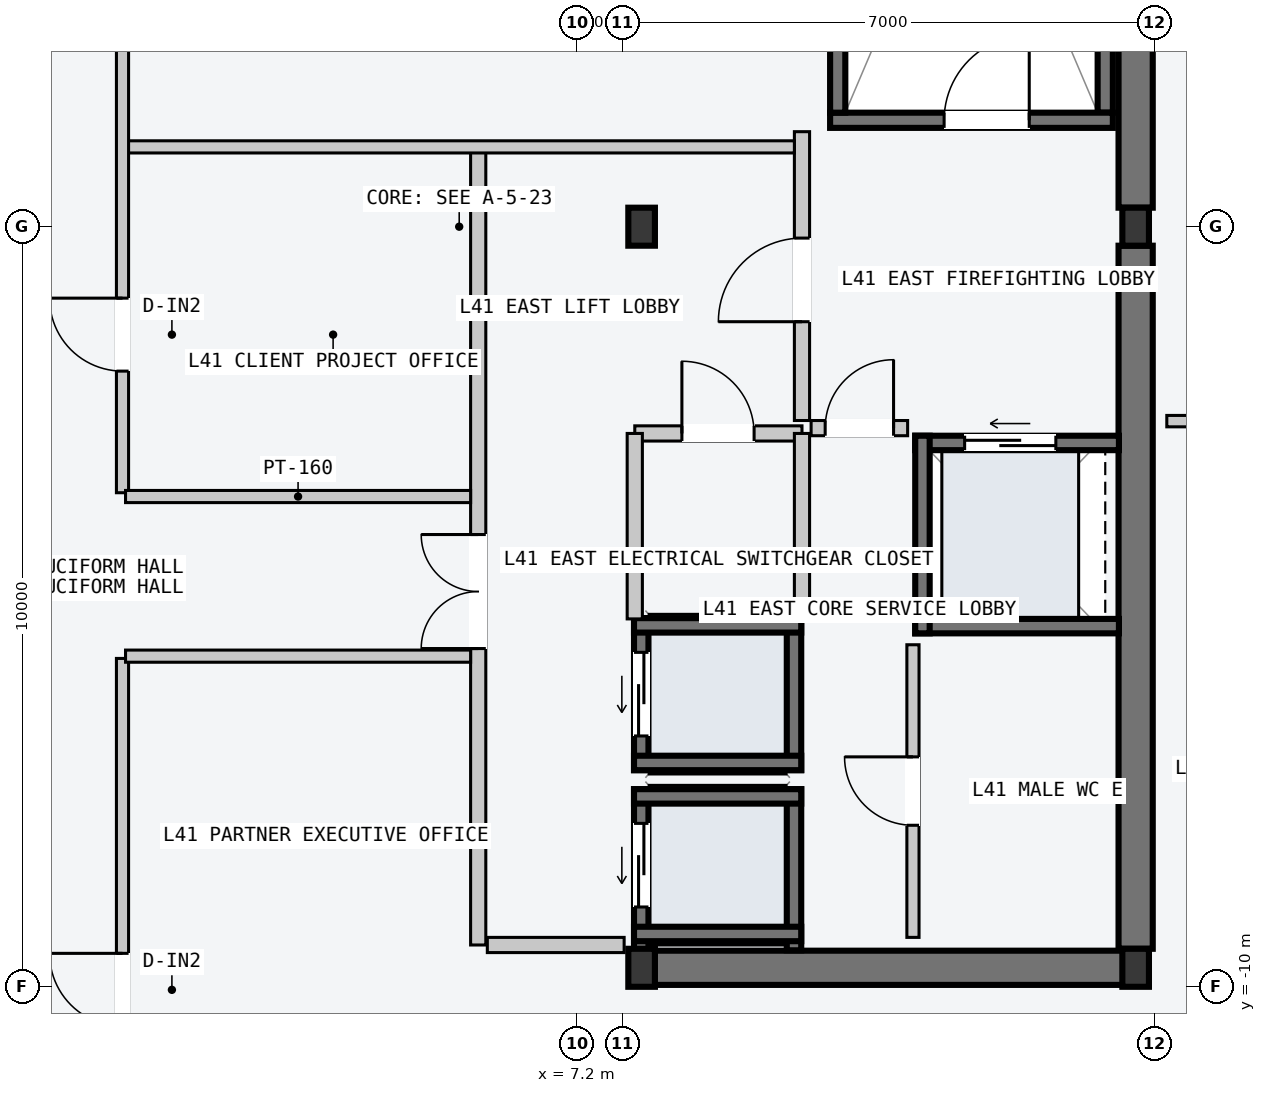
"""IFC4 building model, lengths in metres.
Left out: names, types, materials, properties, quantities, classifications, styles, units other than length and angle.
Written with IfcOpenShell. Run it as: python <this file> out.ifc"""

import sys

from ifc_helpers import new_model, si_unit, direction, frame, frame_2d, origin, origin_2d, place, context, subcontext, project, spatial, rectangle, i_section, extrude, element, fill, save


model = new_model("IFC4")
c1 = context("Model", 3, precision=1e-05, world=origin(), true_north=direction((0.0, 1.0)))
c2 = subcontext(c1, "Body", "Model", "MODEL_VIEW")
j1 = project(units=[si_unit("LENGTHUNIT", "METRE"), si_unit("PLANEANGLEUNIT", "RADIAN")], contexts=[c1])
p1 = place(None, origin())
s1 = spatial("IfcSite", under=j1, at=p1, CompositionType="ELEMENT")
p2 = place(p1, origin())
s2 = spatial("IfcBuilding", under=s1, at=p2, CompositionType="ELEMENT")
p3 = place(p2, frame((0.0, 0.0, 158.7)))
s3 = spatial("IfcBuildingStorey", under=s2, at=p3, CompositionType="ELEMENT", Elevation=158.7)
p4 = place(p3, frame((8.07, -9.75, -0.2), z_axis=(0.0, 0.0, 1.0), x_axis=(1.0, 0.0, 0.0)))
e1 = element("IfcWall", 1, at=p4, inside=s3, PredefinedType="SHEAR", context=c2, shape_type="SweptSolid", body=[
    extrude(rectangle(XDim=6.46, YDim=0.45, at=frame_2d((3.23, 0.0))), origin(), (0.0, 0.0, 1.0), 3.6),
])
for number, where, z_axis, x_axis in (
    (2, (14.55, -9.5, -0.2), (0.0, 0.0, 1.0), (0.0, 1.0, 0.0)),
    (3, (14.55, 0.25, -0.2), (0.0, 0.0, 1.0), (0.0, 1.0, 0.0)),
):
    element("IfcWall", number, at=place(p3, frame(where, z_axis=z_axis, x_axis=x_axis)), inside=s3, PredefinedType="SHEAR", context=c2, shape_type="SweptSolid", body=[
        extrude(rectangle(XDim=9.25, YDim=0.45, at=frame_2d((4.625, 0.0))), origin(), (0.0, 0.0, 1.0), 3.6),
    ])
p5 = place(p3, frame((14.15, 1.5, -0.2), z_axis=(0.0, 0.0, 1.0), x_axis=(0.0, 1.0, 0.0)))
e4 = element("IfcWall", 4, at=p5, inside=s3, PredefinedType="SOLIDWALL", context=c2, shape_type="SweptSolid", body=[
    extrude(rectangle(XDim=7.8, YDim=0.2, at=frame_2d((3.9, 0.0))), origin(), (0.0, 0.0, 1.0), 3.6),
])
p6 = place(p3, frame((10.53, 1.4, -0.2), z_axis=(0.0, 0.0, 1.0), x_axis=(1.0, 0.0, 0.0)))
e5 = element("IfcWall", 5, at=p6, inside=s3, PredefinedType="SOLIDWALL", context=c2, shape_type="SweptSolid", body=[
    extrude(rectangle(XDim=3.72, YDim=0.2, at=frame_2d((1.86, 0.0))), origin(), (0.0, 0.0, 1.0), 3.6),
])
p7 = place(p6, frame((1.5, 0.0, 0.2)))
e6 = element("IfcOpeningElement", 6, at=p7, cuts=e5, PredefinedType="OPENING", context=c2, shape_type="SweptSolid", body=[
    extrude(rectangle(XDim=1.12, YDim=2.18, at=frame_2d((0.56, 1.09))), frame((0.0, 0.11, 0.0), z_axis=(0.0, -1.0, 0.0), x_axis=(1.0, 0.0, 0.0)), (0.0, 0.0, 1.0), 0.22),
])
p8 = place(p3, frame((10.63, 1.5, -0.2), z_axis=(0.0, 0.0, 1.0), x_axis=(0.0, 1.0, 0.0)))
e7 = element("IfcWall", 7, at=p8, inside=s3, PredefinedType="SOLIDWALL", context=c2, shape_type="SweptSolid", body=[
    extrude(rectangle(XDim=7.8, YDim=0.2, at=frame_2d((3.9, 0.0))), origin(), (0.0, 0.0, 1.0), 3.6),
])
for number, where, z_axis, x_axis in (
    (8, (8.05, -9.75, 0.0), (0.0, 0.0, 1.0), (1.0, 0.0, 0.0)),
    (9, (8.05, 0.0, 0.0), (0.0, 0.0, 1.0), (1.0, 0.0, 0.0)),
    (10, (14.55, -9.75, 0.0), (0.0, 0.0, 1.0), (1.0, 0.0, 0.0)),
    (11, (14.55, 0.0, 0.0), (0.0, 0.0, 1.0), (1.0, 0.0, 0.0)),
):
    element("IfcColumn", number, at=place(p3, frame(where, z_axis=z_axis, x_axis=x_axis)), inside=s3, PredefinedType="COLUMN", context=c2, shape_type="SweptSolid", body=[
        extrude(i_section(OverallWidth=0.35, OverallDepth=0.5, WebThickness=0.02, FlangeThickness=0.032, at=origin_2d()), origin(), (0.0, 0.0, 1.0), 3.6),
    ])
p9 = place(p3, frame((8.045, -9.52, -0.2), z_axis=(0.0, 0.0, 1.0), x_axis=(0.0, 1.0, 0.0)))
e12 = element("IfcWall", 12, at=p9, inside=s3, PredefinedType="SOLIDWALL", context=c2, shape_type="SweptSolid", body=[
    extrude(rectangle(XDim=2.12, YDim=0.19, at=frame_2d((1.06, 0.0))), origin(), (0.0, 0.0, 1.0), 3.6),
])
p10 = place(p9, frame((0.57, 0.0, 0.2)))
e13 = element("IfcOpeningElement", 13, at=p10, cuts=e12, PredefinedType="OPENING", context=c2, shape_type="SweptSolid", body=[
    extrude(rectangle(XDim=1.1, YDim=2.2, at=frame_2d((0.55, 1.1))), frame((0.0, 0.105, 0.0), z_axis=(0.0, -1.0, 0.0), x_axis=(1.0, 0.0, 0.0)), (0.0, 0.0, 1.0), 0.21),
])
p11 = place(p3, frame((10.055, -9.52, -0.2), z_axis=(0.0, 0.0, 1.0), x_axis=(0.0, 1.0, 0.0)))
e14 = element("IfcWall", 14, at=p11, inside=s3, PredefinedType="SOLIDWALL", context=c2, shape_type="SweptSolid", body=[
    extrude(rectangle(XDim=2.12, YDim=0.19, at=frame_2d((1.06, 0.0))), origin(), (0.0, 0.0, 1.0), 3.6),
])
for number, where, z_axis, x_axis in (
    (15, (7.95, -7.495, -0.2), (0.0, 0.0, 1.0), (1.0, 0.0, 0.0)),
    (16, (7.95, -9.305, -0.2), (0.0, 0.0, 1.0), (1.0, 0.0, 0.0)),
):
    element("IfcWall", number, at=place(p3, frame(where, z_axis=z_axis, x_axis=x_axis)), inside=s3, PredefinedType="SOLIDWALL", context=c2, shape_type="SweptSolid", body=[
        extrude(rectangle(XDim=2.2, YDim=0.19, at=frame_2d((1.1, 0.0))), origin(), (0.0, 0.0, 1.0), 3.6),
    ])
p12 = place(p3, frame((8.045, -7.15, -0.2), z_axis=(0.0, 0.0, 1.0), x_axis=(0.0, 1.0, 0.0)))
e17 = element("IfcWall", 17, at=p12, inside=s3, PredefinedType="SOLIDWALL", context=c2, shape_type="SweptSolid", body=[
    extrude(rectangle(XDim=2.0, YDim=0.19, at=frame_2d((1.0, 0.0))), origin(), (0.0, 0.0, 1.0), 3.6),
])
p13 = place(p12, frame((0.45, 0.0, 0.2)))
e18 = element("IfcOpeningElement", 18, at=p13, cuts=e17, PredefinedType="OPENING", context=c2, shape_type="SweptSolid", body=[
    extrude(rectangle(XDim=1.1, YDim=2.2, at=frame_2d((0.55, 1.1))), frame((0.0, 0.105, 0.0), z_axis=(0.0, -1.0, 0.0), x_axis=(1.0, 0.0, 0.0)), (0.0, 0.0, 1.0), 0.21),
])
p14 = place(p3, frame((10.055, -7.15, -0.2), z_axis=(0.0, 0.0, 1.0), x_axis=(0.0, 1.0, 0.0)))
e19 = element("IfcWall", 19, at=p14, inside=s3, PredefinedType="SOLIDWALL", context=c2, shape_type="SweptSolid", body=[
    extrude(rectangle(XDim=2.0, YDim=0.19, at=frame_2d((1.0, 0.0))), origin(), (0.0, 0.0, 1.0), 3.6),
])
for number, where, z_axis, x_axis in (
    (20, (7.95, -5.245, -0.2), (0.0, 0.0, 1.0), (1.0, 0.0, 0.0)),
    (21, (7.95, -7.055, -0.2), (0.0, 0.0, 1.0), (1.0, 0.0, 0.0)),
):
    element("IfcWall", number, at=place(p3, frame(where, z_axis=z_axis, x_axis=x_axis)), inside=s3, PredefinedType="SOLIDWALL", context=c2, shape_type="SweptSolid", body=[
        extrude(rectangle(XDim=2.2, YDim=0.19, at=frame_2d((1.1, 0.0))), origin(), (0.0, 0.0, 1.0), 3.6),
    ])
p15 = place(p3, frame((11.65, -2.845, -0.2), z_axis=(0.0, 0.0, 1.0), x_axis=(1.0, 0.0, 0.0)))
e22 = element("IfcWall", 22, at=p15, inside=s3, PredefinedType="SOLIDWALL", context=c2, shape_type="SweptSolid", body=[
    extrude(rectangle(XDim=2.68, YDim=0.19, at=frame_2d((1.34, 0.0))), origin(), (0.0, 0.0, 1.0), 3.6),
])
p16 = place(p15, frame((0.65, 0.0, 0.2)))
e23 = element("IfcOpeningElement", 23, at=p16, cuts=e22, PredefinedType="OPENING", context=c2, shape_type="SweptSolid", body=[
    extrude(rectangle(XDim=1.2, YDim=2.2, at=frame_2d((0.6, 1.1))), frame((0.0, 0.105, 0.0), z_axis=(0.0, -1.0, 0.0), x_axis=(1.0, 0.0, 0.0)), (0.0, 0.0, 1.0), 0.21),
])
p17 = place(p3, frame((11.65, -5.255, -0.2), z_axis=(0.0, 0.0, 1.0), x_axis=(1.0, 0.0, 0.0)))
e24 = element("IfcWall", 24, at=p17, inside=s3, PredefinedType="SOLIDWALL", context=c2, shape_type="SweptSolid", body=[
    extrude(rectangle(XDim=2.68, YDim=0.19, at=frame_2d((1.34, 0.0))), origin(), (0.0, 0.0, 1.0), 3.6),
])
p18 = place(p3, frame((11.745, -5.35, -0.2), z_axis=(0.0, 0.0, 1.0), x_axis=(0.0, 1.0, 0.0)))
e25 = element("IfcWall", 25, at=p18, inside=s3, PredefinedType="SOLIDWALL", context=c2, shape_type="SweptSolid", body=[
    extrude(rectangle(XDim=2.6, YDim=0.19, at=frame_2d((1.3, 0.0))), origin(), (0.0, 0.0, 1.0), 3.6),
])
p19 = place(p3, frame((5.9, -9.45, 0.0), z_axis=(0.0, 0.0, 1.0), x_axis=(0.0, 1.0, 0.0)))
e26 = element("IfcWall", 26, at=p19, inside=s3, PredefinedType="PARTITIONING", context=c2, shape_type="SweptSolid", body=[
    extrude(rectangle(XDim=10.5, YDim=0.2, at=frame_2d((5.25, 0.0))), origin(), (0.0, 0.0, 1.0), 3.4),
])
p20 = place(p19, frame((3.9, 0.0, 0.0)))
e27 = element("IfcOpeningElement", 27, at=p20, cuts=e26, PredefinedType="OPENING", context=c2, shape_type="SweptSolid", body=[
    extrude(rectangle(XDim=1.5, YDim=2.2, at=frame_2d((0.75, 1.1))), frame((0.0, 0.11, 0.0), z_axis=(0.0, -1.0, 0.0), x_axis=(1.0, 0.0, 0.0)), (0.0, 0.0, 1.0), 0.22),
])
p21 = place(p3, frame((6.02, -9.45, 0.0), z_axis=(0.0, 0.0, 1.0), x_axis=(1.0, 0.0, 0.0)))
e28 = element("IfcWall", 28, at=p21, inside=s3, PredefinedType="PARTITIONING", context=c2, shape_type="SweptSolid", body=[
    extrude(rectangle(XDim=1.8, YDim=0.2, at=frame_2d((0.9, 0.0))), origin(), (0.0, 0.0, 1.0), 3.4),
])
p22 = place(p3, frame((10.16, -2.55, 0.0), z_axis=(0.0, 0.0, 1.0), x_axis=(0.0, 1.0, 0.0)))
e29 = element("IfcWall", 29, at=p22, inside=s3, PredefinedType="PARTITIONING", context=c2, shape_type="SweptSolid", body=[
    extrude(rectangle(XDim=3.8, YDim=0.2, at=frame_2d((1.9, 0.0))), origin(), (0.0, 0.0, 1.0), 3.4),
])
p23 = place(p22, frame((1.3, 0.0, 0.0)))
e30 = element("IfcOpeningElement", 30, at=p23, cuts=e29, PredefinedType="OPENING", context=c2, shape_type="SweptSolid", body=[
    extrude(rectangle(XDim=1.1, YDim=2.15, at=frame_2d((0.55, 1.075))), frame((0.0, 0.11, 0.0), z_axis=(0.0, -1.0, 0.0), x_axis=(1.0, 0.0, 0.0)), (0.0, 0.0, 1.0), 0.22),
])
p24 = place(p3, frame((10.28, -2.65, 0.0), z_axis=(0.0, 0.0, 1.0), x_axis=(1.0, 0.0, 0.0)))
e31 = element("IfcWall", 31, at=p24, inside=s3, PredefinedType="PARTITIONING", context=c2, shape_type="SweptSolid", body=[
    extrude(rectangle(XDim=1.27, YDim=0.2, at=frame_2d((0.635, 0.0))), origin(), (0.0, 0.0, 1.0), 3.4),
])
p25 = place(p24, frame((0.185, 0.0, 0.0)))
e32 = element("IfcOpeningElement", 32, at=p25, cuts=e31, PredefinedType="OPENING", context=c2, shape_type="SweptSolid", body=[
    extrude(rectangle(XDim=0.9, YDim=2.15, at=frame_2d((0.45, 1.075))), frame((0.0, 0.11, 0.0), z_axis=(0.0, -1.0, 0.0), x_axis=(1.0, 0.0, 0.0)), (0.0, 0.0, 1.0), 0.22),
])
p26 = place(p3, frame((7.96, -2.72, 0.0), z_axis=(0.0, 0.0, 1.0), x_axis=(1.0, 0.0, 0.0)))
e33 = element("IfcWall", 33, at=p26, inside=s3, PredefinedType="PARTITIONING", context=c2, shape_type="SweptSolid", body=[
    extrude(rectangle(XDim=2.2, YDim=0.2, at=frame_2d((1.1, 0.0))), origin(), (0.0, 0.0, 1.0), 3.4),
])
p27 = place(p26, frame((0.62, 0.0, 0.0)))
e34 = element("IfcOpeningElement", 34, at=p27, cuts=e33, PredefinedType="OPENING", context=c2, shape_type="SweptSolid", body=[
    extrude(rectangle(XDim=0.95, YDim=2.1, at=frame_2d((0.475, 1.05))), frame((0.0, 0.11, 0.0), z_axis=(0.0, -1.0, 0.0), x_axis=(1.0, 0.0, 0.0)), (0.0, 0.0, 1.0), 0.22),
])
for number, where, z_axis, x_axis in (
    (35, (7.96, -5.16, 0.0), (0.0, 0.0, 1.0), (0.0, 1.0, 0.0)),
    (36, (10.16, -5.16, 0.0), (0.0, 0.0, 1.0), (0.0, 1.0, 0.0)),
):
    element("IfcWall", number, at=place(p3, frame(where, z_axis=z_axis, x_axis=x_axis)), inside=s3, PredefinedType="PARTITIONING", context=c2, shape_type="SweptSolid", body=[
        extrude(rectangle(XDim=2.44, YDim=0.2, at=frame_2d((1.22, 0.0))), origin(), (0.0, 0.0, 1.0), 3.4),
    ])
p28 = place(p3, frame((11.62, -9.35, 0.0), z_axis=(0.0, 0.0, 1.0), x_axis=(0.0, 1.0, 0.0)))
e37 = element("IfcWall", 37, at=p28, inside=s3, PredefinedType="PARTITIONING", context=c2, shape_type="SweptSolid", body=[
    extrude(rectangle(XDim=3.85, YDim=0.16, at=frame_2d((1.925, 0.0))), origin(), (0.0, 0.0, 1.0), 3.4),
])
p29 = place(p28, frame((1.475, 0.0, 0.0)))
e38 = element("IfcOpeningElement", 38, at=p29, cuts=e37, PredefinedType="OPENING", context=c2, shape_type="SweptSolid", body=[
    extrude(rectangle(XDim=0.9, YDim=2.15, at=frame_2d((0.45, 1.075))), frame((0.0, 0.09, 0.0), z_axis=(0.0, -1.0, 0.0), x_axis=(1.0, 0.0, 0.0)), (0.0, 0.0, 1.0), 0.18),
])
p30 = place(p3, frame((1.26, 1.05, 0.0), z_axis=(0.0, 0.0, 1.0), x_axis=(1.0, 0.0, 0.0)))
e39 = element("IfcWall", 39, at=p30, inside=s3, PredefinedType="PARTITIONING", context=c2, shape_type="SweptSolid", body=[
    extrude(rectangle(XDim=8.8, YDim=0.16, at=frame_2d((4.4, 0.0))), origin(), (0.0, 0.0, 1.0), 3.4),
])
p31 = place(p3, frame((1.22, -3.5, 0.0), z_axis=(0.0, 0.0, 1.0), x_axis=(0.0, 1.0, 0.0)))
e40 = element("IfcWall", 40, at=p31, inside=s3, PredefinedType="PARTITIONING", context=c2, shape_type="SweptSolid", body=[
    extrude(rectangle(XDim=13.51, YDim=0.16, at=frame_2d((6.755, 0.0))), origin(), (0.0, 0.0, 1.0), 3.4),
])
p32 = place(p31, frame((6.1, 0.0, 0.0)))
e41 = element("IfcOpeningElement", 41, at=p32, cuts=e40, PredefinedType="OPENING", context=c2, shape_type="SweptSolid", body=[
    extrude(rectangle(XDim=1.24, YDim=2.24, at=frame_2d((0.62, 1.12))), frame((0.0, 0.09, 0.0), z_axis=(0.0, -1.0, 0.0), x_axis=(1.0, 0.0, 0.0)), (0.0, 0.0, 1.0), 0.18),
])
p33 = place(p31, frame((1.6, 0.0, 0.0)))
e42 = element("IfcOpeningElement", 42, at=p33, cuts=e40, PredefinedType="OPENING", context=c2, shape_type="SweptSolid", body=[
    extrude(rectangle(XDim=0.96, YDim=2.18, at=frame_2d((0.48, 1.09))), frame((0.0, 0.09, 0.0), z_axis=(0.0, -1.0, 0.0), x_axis=(1.0, 0.0, 0.0)), (0.0, 0.0, 1.0), 0.18),
])
p34 = place(p3, frame((1.26, -3.55, 0.0), z_axis=(0.0, 0.0, 1.0), x_axis=(1.0, 0.0, 0.0)))
e43 = element("IfcWall", 43, at=p34, inside=s3, PredefinedType="PARTITIONING", context=c2, shape_type="SweptSolid", body=[
    extrude(rectangle(XDim=4.54, YDim=0.16, at=frame_2d((2.27, 0.0))), origin(), (0.0, 0.0, 1.0), 3.4),
])
p35 = place(p3, frame((1.22, -11.67, 0.0), z_axis=(0.0, 0.0, 1.0), x_axis=(0.0, 1.0, 0.0)))
e44 = element("IfcWall", 44, at=p35, inside=s3, PredefinedType="PARTITIONING", context=c2, shape_type="SweptSolid", body=[
    extrude(rectangle(XDim=5.99, YDim=0.16, at=frame_2d((2.995, 0.0))), origin(), (0.0, 0.0, 1.0), 3.4),
])
p36 = place(p35, frame((1.15, 0.0, 0.0)))
e45 = element("IfcOpeningElement", 45, at=p36, cuts=e44, PredefinedType="OPENING", context=c2, shape_type="SweptSolid", body=[
    extrude(rectangle(XDim=0.96, YDim=2.18, at=frame_2d((0.48, 1.09))), frame((0.0, 0.09, 0.0), z_axis=(0.0, -1.0, 0.0), x_axis=(1.0, 0.0, 0.0)), (0.0, 0.0, 1.0), 0.18),
])
p37 = place(p3, frame((1.26, -5.65, 0.0), z_axis=(0.0, 0.0, 1.0), x_axis=(1.0, 0.0, 0.0)))
e46 = element("IfcWall", 46, at=p37, inside=s3, PredefinedType="PARTITIONING", context=c2, shape_type="SweptSolid", body=[
    extrude(rectangle(XDim=4.54, YDim=0.16, at=frame_2d((2.27, 0.0))), origin(), (0.0, 0.0, 1.0), 3.4),
])
p38 = place(p3, frame((14.96, -2.558, 0.0), z_axis=(0.0, 0.0, 1.0), x_axis=(1.0, 0.0, 0.0)))
e47 = element("IfcWall", 47, at=p38, inside=s3, PredefinedType="PARTITIONING", context=c2, shape_type="SweptSolid", body=[
    extrude(rectangle(XDim=5.6, YDim=0.15, at=frame_2d((2.8, 0.0))), origin(), (0.0, 0.0, 1.0), 3.4),
])
p39 = place(p38, frame((0.9, 0.0, 0.0)))
e48 = element("IfcOpeningElement", 48, at=p39, cuts=e47, PredefinedType="OPENING", context=c2, shape_type="SweptSolid", body=[
    extrude(rectangle(XDim=0.96, YDim=2.18, at=frame_2d((0.48, 1.09))), frame((0.0, 0.085, 0.0), z_axis=(0.0, -1.0, 0.0), x_axis=(1.0, 0.0, 0.0)), (0.0, 0.0, 1.0), 0.17),
])
p40 = place(p7, origin())
e49 = element("IfcDoor", 49, at=p40, inside=s3, OperationType="SINGLE_SWING_RIGHT", PredefinedType="DOOR", context=c2, shape_type="SweptSolid", body=[
    extrude(rectangle(XDim=1.12, YDim=2.18, at=frame_2d((0.56, 1.09))), frame((0.0, 0.025, 0.0), z_axis=(0.0, -1.0, 0.0), x_axis=(1.0, 0.0, 0.0)), (0.0, 0.0, 1.0), 0.05),
])
fill(e6, e49)
p41 = place(p10, origin())
e50 = element("IfcDoor", 50, at=p41, inside=s3, OperationType="SLIDING_TO_LEFT", PredefinedType="DOOR", context=c2, shape_type="SweptSolid", body=[
    extrude(rectangle(XDim=1.1, YDim=2.2, at=frame_2d((0.55, 1.1))), frame((0.0, 0.025, 0.0), z_axis=(0.0, -1.0, 0.0), x_axis=(1.0, 0.0, 0.0)), (0.0, 0.0, 1.0), 0.05),
])
fill(e13, e50)
p42 = place(p13, origin())
e51 = element("IfcDoor", 51, at=p42, inside=s3, OperationType="SLIDING_TO_LEFT", PredefinedType="DOOR", context=c2, shape_type="SweptSolid", body=[
    extrude(rectangle(XDim=1.1, YDim=2.2, at=frame_2d((0.55, 1.1))), frame((0.0, 0.025, 0.0), z_axis=(0.0, -1.0, 0.0), x_axis=(1.0, 0.0, 0.0)), (0.0, 0.0, 1.0), 0.05),
])
fill(e18, e51)
p43 = place(p16, origin())
e52 = element("IfcDoor", 52, at=p43, inside=s3, OperationType="SLIDING_TO_LEFT", PredefinedType="DOOR", context=c2, shape_type="SweptSolid", body=[
    extrude(rectangle(XDim=1.2, YDim=2.2, at=frame_2d((0.6, 1.1))), frame((0.0, 0.025, 0.0), z_axis=(0.0, -1.0, 0.0), x_axis=(1.0, 0.0, 0.0)), (0.0, 0.0, 1.0), 0.05),
])
fill(e23, e52)
p44 = place(p20, origin())
e53 = element("IfcDoor", 53, at=p44, inside=s3, OperationType="DOUBLE_DOOR_SINGLE_SWING", PredefinedType="DOOR", context=c2, shape_type="SweptSolid", body=[
    extrude(rectangle(XDim=1.5, YDim=2.2, at=frame_2d((0.75, 1.1))), frame((0.0, 0.025, 0.0), z_axis=(0.0, -1.0, 0.0), x_axis=(1.0, 0.0, 0.0)), (0.0, 0.0, 1.0), 0.05),
])
fill(e27, e53)
p45 = place(p23, origin())
e54 = element("IfcDoor", 54, at=p45, inside=s3, OperationType="SINGLE_SWING_LEFT", PredefinedType="DOOR", context=c2, shape_type="SweptSolid", body=[
    extrude(rectangle(XDim=1.1, YDim=2.15, at=frame_2d((0.55, 1.075))), frame((0.0, 0.025, 0.0), z_axis=(0.0, -1.0, 0.0), x_axis=(1.0, 0.0, 0.0)), (0.0, 0.0, 1.0), 0.05),
])
fill(e30, e54)
p46 = place(p25, origin())
e55 = element("IfcDoor", 55, at=p46, inside=s3, OperationType="SINGLE_SWING_RIGHT", PredefinedType="DOOR", context=c2, shape_type="SweptSolid", body=[
    extrude(rectangle(XDim=0.9, YDim=2.15, at=frame_2d((0.45, 1.075))), frame((0.0, 0.025, 0.0), z_axis=(0.0, -1.0, 0.0), x_axis=(1.0, 0.0, 0.0)), (0.0, 0.0, 1.0), 0.05),
])
fill(e32, e55)
p47 = place(p27, origin())
e56 = element("IfcDoor", 56, at=p47, inside=s3, OperationType="SINGLE_SWING_LEFT", PredefinedType="DOOR", context=c2, shape_type="SweptSolid", body=[
    extrude(rectangle(XDim=0.95, YDim=2.1, at=frame_2d((0.475, 1.05))), frame((0.0, 0.025, 0.0), z_axis=(0.0, -1.0, 0.0), x_axis=(1.0, 0.0, 0.0)), (0.0, 0.0, 1.0), 0.05),
])
fill(e34, e56)
p48 = place(p29, origin())
e57 = element("IfcDoor", 57, at=p48, inside=s3, OperationType="SINGLE_SWING_RIGHT", PredefinedType="DOOR", context=c2, shape_type="SweptSolid", body=[
    extrude(rectangle(XDim=0.9, YDim=2.15, at=frame_2d((0.45, 1.075))), frame((0.0, 0.025, 0.0), z_axis=(0.0, -1.0, 0.0), x_axis=(1.0, 0.0, 0.0)), (0.0, 0.0, 1.0), 0.05),
])
fill(e38, e57)
p49 = place(p33, origin())
e58 = element("IfcDoor", 58, at=p49, inside=s3, OperationType="SINGLE_SWING_RIGHT", PredefinedType="DOOR", context=c2, shape_type="SweptSolid", body=[
    extrude(rectangle(XDim=0.96, YDim=2.18, at=frame_2d((0.48, 1.09))), frame((0.0, 0.025, 0.0), z_axis=(0.0, -1.0, 0.0), x_axis=(1.0, 0.0, 0.0)), (0.0, 0.0, 1.0), 0.05),
])
fill(e42, e58)
p50 = place(p36, origin())
e59 = element("IfcDoor", 59, at=p50, inside=s3, OperationType="SINGLE_SWING_RIGHT", PredefinedType="DOOR", context=c2, shape_type="SweptSolid", body=[
    extrude(rectangle(XDim=0.96, YDim=2.18, at=frame_2d((0.48, 1.09))), frame((0.0, 0.025, 0.0), z_axis=(0.0, -1.0, 0.0), x_axis=(1.0, 0.0, 0.0)), (0.0, 0.0, 1.0), 0.05),
])
fill(e45, e59)
save(model, sys.argv[1])
